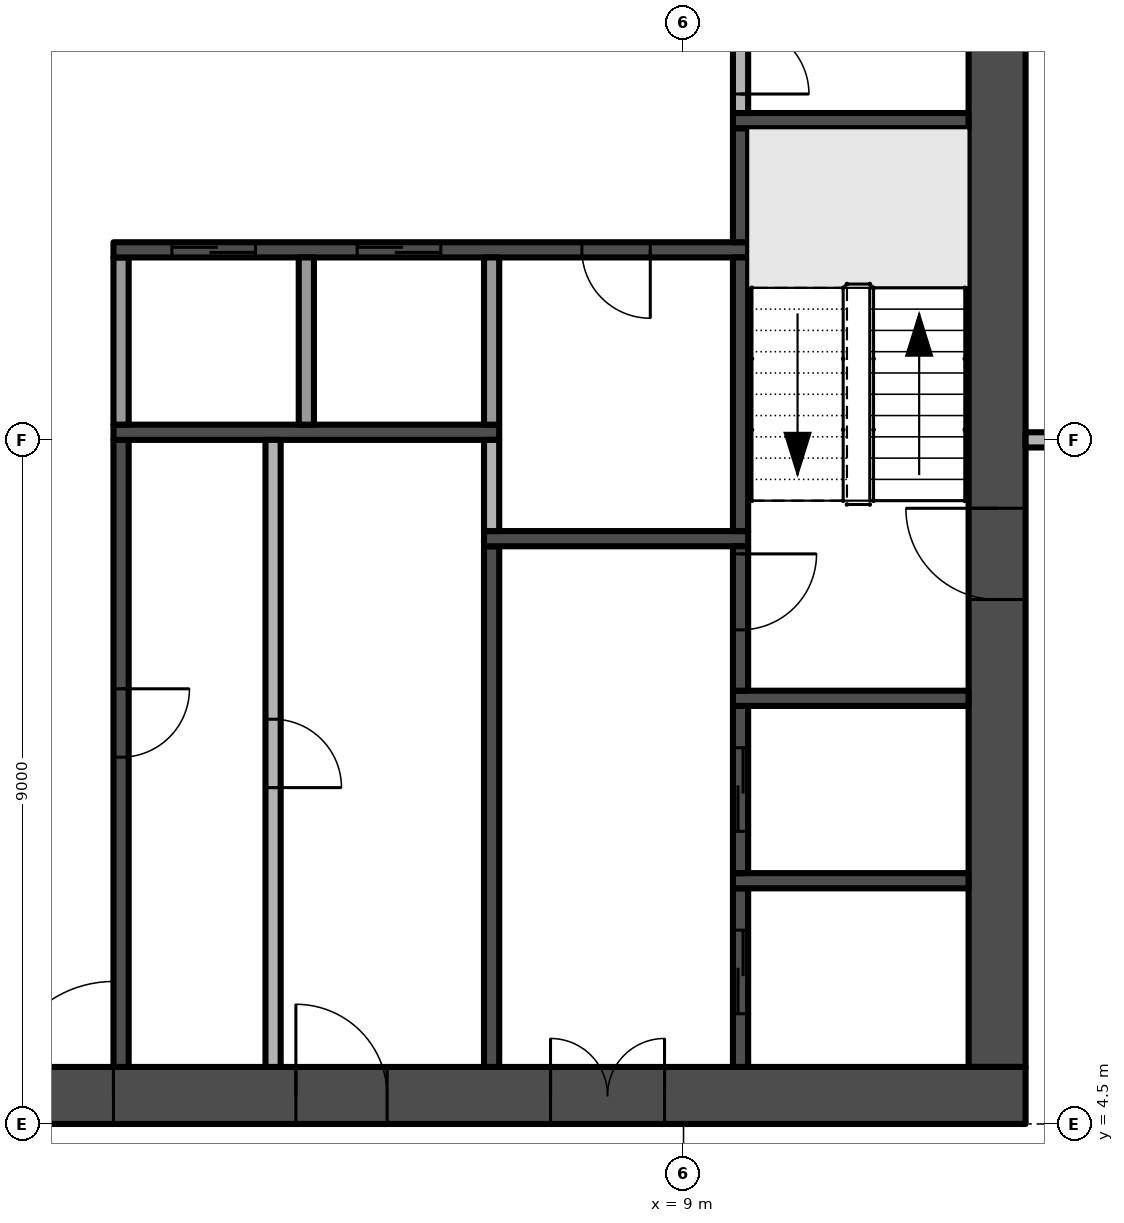
"""IFC4 building model, lengths in metres.
Left out: names, types, materials, properties, quantities, classifications, styles, units other than length and angle.
Written with IfcOpenShell. Run it as: python <this file> out.ifc"""

import sys

from ifc_helpers import new_model, si_unit, direction, frame, frame_2d, origin, place, context, subcontext, project, spatial, rectangle, extrude, element, fill, save


model = new_model("IFC4")
c1 = context("Model", 3, precision=1e-05, world=origin(), true_north=direction((0.0, 1.0)))
c2 = subcontext(c1, "Body", "Model", "MODEL_VIEW")
j1 = project(units=[si_unit("LENGTHUNIT", "METRE"), si_unit("PLANEANGLEUNIT", "RADIAN")], contexts=[c1])
p1 = place(None, origin())
s1 = spatial("IfcSite", under=j1, at=p1, CompositionType="ELEMENT")
p2 = place(p1, origin())
s2 = spatial("IfcBuilding", under=s1, at=p2, CompositionType="ELEMENT")
p3 = place(p2, frame((0.0, 0.0, 155.4)))
s3 = spatial("IfcBuildingStorey", under=s2, at=p3, CompositionType="ELEMENT", Elevation=155.4)
p4 = place(p3, frame((-13.5, 4.875, -0.3), z_axis=(0.0, 0.0, 1.0), x_axis=(1.0, 0.0, 0.0)))
e1 = element("IfcWall", 1, at=p4, inside=s3, PredefinedType="SHEAR", context=c2, shape_type="SweptSolid", body=[
    extrude(rectangle(XDim=27.0, YDim=0.75, at=frame_2d((13.5, 0.0))), origin(), (0.0, 0.0, 1.0), 3.8),
])
p5 = place(p4, frame((12.0, 0.0, 0.3)))
e2 = element("IfcOpeningElement", 2, at=p5, cuts=e1, PredefinedType="OPENING", context=c2, shape_type="SweptSolid", body=[
    extrude(rectangle(XDim=3.0, YDim=2.4, at=frame_2d((1.5, 1.2))), frame((0.0, 0.385, 0.0), z_axis=(0.0, -1.0, 0.0), x_axis=(1.0, 0.0, 0.0)), (0.0, 0.0, 1.0), 0.77),
])
p6 = place(p4, frame((4.9, 0.0, 0.3)))
e3 = element("IfcOpeningElement", 3, at=p6, cuts=e1, PredefinedType="OPENING", context=c2, shape_type="SweptSolid", body=[
    extrude(rectangle(XDim=1.2, YDim=2.2, at=frame_2d((0.6, 1.1))), frame((0.0, 0.385, 0.0), z_axis=(0.0, -1.0, 0.0), x_axis=(1.0, 0.0, 0.0)), (0.0, 0.0, 1.0), 0.77),
])
p7 = place(p4, frame((20.75, 0.0, 0.3)))
e4 = element("IfcOpeningElement", 4, at=p7, cuts=e1, PredefinedType="OPENING", context=c2, shape_type="SweptSolid", body=[
    extrude(rectangle(XDim=1.5, YDim=2.2, at=frame_2d((0.75, 1.1))), frame((0.0, 0.385, 0.0), z_axis=(0.0, -1.0, 0.0), x_axis=(1.0, 0.0, 0.0)), (0.0, 0.0, 1.0), 0.77),
])
p8 = place(p4, frame((17.4, 0.0, 0.3)))
e5 = element("IfcOpeningElement", 5, at=p8, cuts=e1, PredefinedType="OPENING", context=c2, shape_type="SweptSolid", body=[
    extrude(rectangle(XDim=1.2, YDim=2.2, at=frame_2d((0.6, 1.1))), frame((0.0, 0.385, 0.0), z_axis=(0.0, -1.0, 0.0), x_axis=(1.0, 0.0, 0.0)), (0.0, 0.0, 1.0), 0.77),
])
p9 = place(p3, frame((13.125, 5.25, -0.3), z_axis=(0.0, 0.0, 1.0), x_axis=(0.0, 1.0, 0.0)))
e6 = element("IfcWall", 6, at=p9, inside=s3, PredefinedType="SHEAR", context=c2, shape_type="SweptSolid", body=[
    extrude(rectangle(XDim=16.5, YDim=0.75, at=frame_2d((8.25, 0.0))), origin(), (0.0, 0.0, 1.0), 3.8),
])
p10 = place(p9, frame((6.15, 0.0, 0.3)))
e7 = element("IfcOpeningElement", 7, at=p10, cuts=e6, PredefinedType="OPENING", context=c2, shape_type="SweptSolid", body=[
    extrude(rectangle(XDim=1.2, YDim=2.2, at=frame_2d((0.6, 1.1))), frame((0.0, 0.385, 0.0), z_axis=(0.0, -1.0, 0.0), x_axis=(1.0, 0.0, 0.0)), (0.0, 0.0, 1.0), 0.77),
])
p11 = place(p3, frame((1.6, 13.5, 0.0), z_axis=(0.0, 0.0, 1.0), x_axis=(0.0, -1.0, 0.0)))
e8 = element("IfcWall", 8, at=p11, inside=s3, PredefinedType="SHEAR", context=c2, shape_type="SweptSolid", body=[
    extrude(rectangle(XDim=8.25, YDim=0.2, at=frame_2d((4.125, 0.0))), origin(), (0.0, 0.0, 1.0), 3.5),
])
p12 = place(p11, frame((3.275, 0.0, 0.0)))
e9 = element("IfcOpeningElement", 9, at=p12, cuts=e8, PredefinedType="OPENING", context=c2, shape_type="SweptSolid", body=[
    extrude(rectangle(XDim=0.9, YDim=2.1, at=frame_2d((0.45, 1.05))), frame((0.0, 0.11, 0.0), z_axis=(0.0, -1.0, 0.0), x_axis=(1.0, 0.0, 0.0)), (0.0, 0.0, 1.0), 0.22),
])
p13 = place(p3, frame((1.5, 13.6, 0.0), z_axis=(0.0, 0.0, 1.0), x_axis=(1.0, 0.0, 0.0)))
e10 = element("IfcWall", 10, at=p13, inside=s3, PredefinedType="SHEAR", context=c2, shape_type="SweptSolid", body=[
    extrude(rectangle(XDim=5.075, YDim=0.2, at=frame_2d((2.538, 0.0))), origin(), (0.0, 0.0, 1.0), 3.5),
])
p14 = place(p3, frame((1.6, 13.7, 0.0), z_axis=(0.0, 0.0, 1.0), x_axis=(0.0, 1.0, 0.0)))
e11 = element("IfcWall", 11, at=p14, inside=s3, PredefinedType="PARTITIONING", context=c2, shape_type="SweptSolid", body=[
    extrude(rectangle(XDim=2.2, YDim=0.2, at=frame_2d((1.1, 0.0))), origin(), (0.0, 0.0, 1.0), 3.5),
])
p15 = place(p3, frame((9.85, 16.0, 0.0), z_axis=(0.0, 0.0, 1.0), x_axis=(-1.0, 0.0, 0.0)))
e12 = element("IfcWall", 12, at=p15, inside=s3, PredefinedType="SHEAR", context=c2, shape_type="SweptSolid", body=[
    extrude(rectangle(XDim=8.35, YDim=0.2, at=frame_2d((4.175, 0.0))), origin(), (0.0, 0.0, 1.0), 3.5),
])
p16 = place(p15, frame((6.481, 0.0, 0.0)))
e13 = element("IfcOpeningElement", 13, at=p16, cuts=e12, PredefinedType="OPENING", context=c2, shape_type="SweptSolid", body=[
    extrude(rectangle(XDim=1.1, YDim=2.1, at=frame_2d((0.55, 1.05))), frame((0.0, 0.11, 0.0), z_axis=(0.0, -1.0, 0.0), x_axis=(1.0, 0.0, 0.0)), (0.0, 0.0, 1.0), 0.22),
])
p17 = place(p15, frame((4.044, 0.0, 0.0)))
e14 = element("IfcOpeningElement", 14, at=p17, cuts=e12, PredefinedType="OPENING", context=c2, shape_type="SweptSolid", body=[
    extrude(rectangle(XDim=1.1, YDim=2.1, at=frame_2d((0.55, 1.05))), frame((0.0, 0.11, 0.0), z_axis=(0.0, -1.0, 0.0), x_axis=(1.0, 0.0, 0.0)), (0.0, 0.0, 1.0), 0.22),
])
p18 = place(p15, frame((1.288, 0.0, 0.0)))
e15 = element("IfcOpeningElement", 15, at=p18, cuts=e12, PredefinedType="OPENING", context=c2, shape_type="SweptSolid", body=[
    extrude(rectangle(XDim=0.9, YDim=2.1, at=frame_2d((0.45, 1.05))), frame((0.0, 0.11, 0.0), z_axis=(0.0, -1.0, 0.0), x_axis=(1.0, 0.0, 0.0)), (0.0, 0.0, 1.0), 0.22),
])
p19 = place(p3, frame((3.6, 13.5, 0.0), z_axis=(0.0, 0.0, 1.0), x_axis=(0.0, -1.0, 0.0)))
e16 = element("IfcWall", 16, at=p19, inside=s3, PredefinedType="PARTITIONING", context=c2, shape_type="SweptSolid", body=[
    extrude(rectangle(XDim=8.25, YDim=0.2, at=frame_2d((4.125, 0.0))), origin(), (0.0, 0.0, 1.0), 3.5),
])
p20 = place(p19, frame((3.675, 0.0, 0.0)))
e17 = element("IfcOpeningElement", 17, at=p20, cuts=e16, PredefinedType="OPENING", context=c2, shape_type="SweptSolid", body=[
    extrude(rectangle(XDim=0.9, YDim=2.1, at=frame_2d((0.45, 1.05))), frame((0.0, 0.11, 0.0), z_axis=(0.0, -1.0, 0.0), x_axis=(1.0, 0.0, 0.0)), (0.0, 0.0, 1.0), 0.22),
])
p21 = place(p3, frame((4.037, 13.7, 0.0), z_axis=(0.0, 0.0, 1.0), x_axis=(0.0, 1.0, 0.0)))
e18 = element("IfcWall", 18, at=p21, inside=s3, PredefinedType="PARTITIONING", context=c2, shape_type="SweptSolid", body=[
    extrude(rectangle(XDim=2.2, YDim=0.2, at=frame_2d((1.1, 0.0))), origin(), (0.0, 0.0, 1.0), 3.5),
])
p22 = place(p3, frame((6.475, 5.25, 0.0), z_axis=(0.0, 0.0, 1.0), x_axis=(0.0, 1.0, 0.0)))
e19 = element("IfcWall", 19, at=p22, inside=s3, PredefinedType="SHEAR", context=c2, shape_type="SweptSolid", body=[
    extrude(rectangle(XDim=6.85, YDim=0.2, at=frame_2d((3.425, 0.0))), origin(), (0.0, 0.0, 1.0), 3.5),
])
p23 = place(p3, frame((6.375, 12.2, 0.0), z_axis=(0.0, 0.0, 1.0), x_axis=(1.0, 0.0, 0.0)))
e20 = element("IfcWall", 20, at=p23, inside=s3, PredefinedType="SHEAR", context=c2, shape_type="SweptSolid", body=[
    extrude(rectangle(XDim=3.475, YDim=0.2, at=frame_2d((1.738, 0.0))), origin(), (0.0, 0.0, 1.0), 3.5),
])
p24 = place(p3, frame((6.475, 12.3, 0.0), z_axis=(0.0, 0.0, 1.0), x_axis=(0.0, 1.0, 0.0)))
e21 = element("IfcWall", 21, at=p24, inside=s3, PredefinedType="PARTITIONING", context=c2, shape_type="SweptSolid", body=[
    extrude(rectangle(XDim=1.2, YDim=0.2, at=frame_2d((0.6, 0.0))), origin(), (0.0, 0.0, 1.0), 3.5),
])
p25 = place(p3, frame((6.475, 13.7, 0.0), z_axis=(0.0, 0.0, 1.0), x_axis=(0.0, 1.0, 0.0)))
e22 = element("IfcWall", 22, at=p25, inside=s3, PredefinedType="PARTITIONING", context=c2, shape_type="SweptSolid", body=[
    extrude(rectangle(XDim=2.2, YDim=0.2, at=frame_2d((1.1, 0.0))), origin(), (0.0, 0.0, 1.0), 3.5),
])
p26 = place(p3, frame((9.75, 5.25, 0.0), z_axis=(0.0, 0.0, 1.0), x_axis=(0.0, 1.0, 0.0)))
e23 = element("IfcWall", 23, at=p26, inside=s3, PredefinedType="SHEAR", context=c2, shape_type="SweptSolid", body=[
    extrude(rectangle(XDim=2.35, YDim=0.2, at=frame_2d((1.175, 0.0))), origin(), (0.0, 0.0, 1.0), 3.5),
])
p27 = place(p26, frame((0.7, 0.0, 0.0)))
e24 = element("IfcOpeningElement", 24, at=p27, cuts=e23, PredefinedType="OPENING", context=c2, shape_type="SweptSolid", body=[
    extrude(rectangle(XDim=1.1, YDim=2.1, at=frame_2d((0.55, 1.05))), frame((0.0, 0.11, 0.0), z_axis=(0.0, -1.0, 0.0), x_axis=(1.0, 0.0, 0.0)), (0.0, 0.0, 1.0), 0.22),
])
p28 = place(p3, frame((9.65, 7.7, 0.0), z_axis=(0.0, 0.0, 1.0), x_axis=(1.0, 0.0, 0.0)))
e25 = element("IfcWall", 25, at=p28, inside=s3, PredefinedType="SHEAR", context=c2, shape_type="SweptSolid", body=[
    extrude(rectangle(XDim=3.1, YDim=0.2, at=frame_2d((1.55, 0.0))), origin(), (0.0, 0.0, 1.0), 3.5),
])
p29 = place(p3, frame((9.75, 7.8, 0.0), z_axis=(0.0, 0.0, 1.0), x_axis=(0.0, 1.0, 0.0)))
e26 = element("IfcWall", 26, at=p29, inside=s3, PredefinedType="SHEAR", context=c2, shape_type="SweptSolid", body=[
    extrude(rectangle(XDim=2.2, YDim=0.2, at=frame_2d((1.1, 0.0))), origin(), (0.0, 0.0, 1.0), 3.5),
])
p30 = place(p29, frame((0.55, 0.0, 0.0)))
e27 = element("IfcOpeningElement", 27, at=p30, cuts=e26, PredefinedType="OPENING", context=c2, shape_type="SweptSolid", body=[
    extrude(rectangle(XDim=1.1, YDim=2.1, at=frame_2d((0.55, 1.05))), frame((0.0, 0.11, 0.0), z_axis=(0.0, -1.0, 0.0), x_axis=(1.0, 0.0, 0.0)), (0.0, 0.0, 1.0), 0.22),
])
p31 = place(p3, frame((9.65, 10.1, 0.0), z_axis=(0.0, 0.0, 1.0), x_axis=(1.0, 0.0, 0.0)))
e28 = element("IfcWall", 28, at=p31, inside=s3, PredefinedType="SHEAR", context=c2, shape_type="SweptSolid", body=[
    extrude(rectangle(XDim=3.1, YDim=0.2, at=frame_2d((1.55, 0.0))), origin(), (0.0, 0.0, 1.0), 3.5),
])
p32 = place(p3, frame((9.75, 12.1, 0.0), z_axis=(0.0, 0.0, 1.0), x_axis=(0.0, -1.0, 0.0)))
e29 = element("IfcWall", 29, at=p32, inside=s3, PredefinedType="SHEAR", context=c2, shape_type="SweptSolid", body=[
    extrude(rectangle(XDim=1.9, YDim=0.2, at=frame_2d((0.95, 0.0))), origin(), (0.0, 0.0, 1.0), 3.5),
])
p33 = place(p32, frame((0.1, 0.0, 0.0)))
e30 = element("IfcOpeningElement", 30, at=p33, cuts=e29, PredefinedType="OPENING", context=c2, shape_type="SweptSolid", body=[
    extrude(rectangle(XDim=1.0, YDim=2.2, at=frame_2d((0.5, 1.1))), frame((0.0, 0.11, 0.0), z_axis=(0.0, -1.0, 0.0), x_axis=(1.0, 0.0, 0.0)), (0.0, 0.0, 1.0), 0.22),
])
p34 = place(p3, frame((9.75, 12.3, 0.0), z_axis=(0.0, 0.0, 1.0), x_axis=(0.0, 1.0, 0.0)))
e31 = element("IfcWall", 31, at=p34, inside=s3, PredefinedType="SHEAR", context=c2, shape_type="SweptSolid", body=[
    extrude(rectangle(XDim=3.6, YDim=0.2, at=frame_2d((1.8, 0.0))), origin(), (0.0, 0.0, 1.0), 3.5),
])
p35 = place(p3, frame((9.75, 16.1, 0.0), z_axis=(0.0, 0.0, 1.0), x_axis=(0.0, 1.0, 0.0)))
e32 = element("IfcWall", 32, at=p35, inside=s3, PredefinedType="SHEAR", context=c2, shape_type="SweptSolid", body=[
    extrude(rectangle(XDim=1.5, YDim=0.2, at=frame_2d((0.75, 0.0))), origin(), (0.0, 0.0, 1.0), 3.5),
])
p36 = place(p3, frame((9.65, 17.7, 0.0), z_axis=(0.0, 0.0, 1.0), x_axis=(1.0, 0.0, 0.0)))
e33 = element("IfcWall", 33, at=p36, inside=s3, PredefinedType="SHEAR", context=c2, shape_type="SweptSolid", body=[
    extrude(rectangle(XDim=3.1, YDim=0.2, at=frame_2d((1.55, 0.0))), origin(), (0.0, 0.0, 1.0), 3.5),
])
p37 = place(p3, frame((9.75, 19.2, 0.0), z_axis=(0.0, 0.0, 1.0), x_axis=(0.0, -1.0, 0.0)))
e34 = element("IfcWall", 34, at=p37, inside=s3, PredefinedType="PARTITIONING", context=c2, shape_type="SweptSolid", body=[
    extrude(rectangle(XDim=1.4, YDim=0.2, at=frame_2d((0.7, 0.0))), origin(), (0.0, 0.0, 1.0), 3.5),
])
p38 = place(p37, frame((0.25, 0.0, 0.0)))
e35 = element("IfcOpeningElement", 35, at=p38, cuts=e34, PredefinedType="OPENING", context=c2, shape_type="SweptSolid", body=[
    extrude(rectangle(XDim=0.9, YDim=2.1, at=frame_2d((0.45, 1.05))), frame((0.0, 0.11, 0.0), z_axis=(0.0, -1.0, 0.0), x_axis=(1.0, 0.0, 0.0)), (0.0, 0.0, 1.0), 0.22),
])
p39 = place(p3, frame((13.5, 13.5, 0.0), z_axis=(0.0, 0.0, 1.0), x_axis=(1.0, 0.0, 0.0)))
e36 = element("IfcWall", 36, at=p39, inside=s3, PredefinedType="PARTITIONING", context=c2, shape_type="SweptSolid", body=[
    extrude(rectangle(XDim=3.875, YDim=0.2, at=frame_2d((1.938, 0.0))), origin(), (0.0, 0.0, 1.0), 3.5),
])
p40 = place(p39, frame((1.6, 0.0, 0.0)))
e37 = element("IfcOpeningElement", 37, at=p40, cuts=e36, PredefinedType="OPENING", context=c2, shape_type="SweptSolid", body=[
    extrude(rectangle(XDim=0.9, YDim=2.1, at=frame_2d((0.45, 1.05))), frame((0.0, 0.11, 0.0), z_axis=(0.0, -1.0, 0.0), x_axis=(1.0, 0.0, 0.0)), (0.0, 0.0, 1.0), 0.22),
])
p41 = place(p5, frame((3.0, 0.0, 0.0), z_axis=(0.0, 0.0, 1.0), x_axis=(-1.0, 0.0, 0.0)))
e38 = element("IfcDoor", 38, at=p41, inside=s3, OperationType="DOUBLE_DOOR_SINGLE_SWING", PredefinedType="DOOR", context=c2, shape_type="SweptSolid", body=[
    extrude(rectangle(XDim=3.0, YDim=2.4, at=frame_2d((1.5, 1.2))), frame((0.0, 0.025, 0.0), z_axis=(0.0, -1.0, 0.0), x_axis=(1.0, 0.0, 0.0)), (0.0, 0.0, 1.0), 0.05),
])
fill(e2, e38)
p42 = place(p10, frame((1.2, 0.0, 0.0), z_axis=(0.0, 0.0, 1.0), x_axis=(-1.0, 0.0, 0.0)))
e39 = element("IfcDoor", 39, at=p42, inside=s3, OperationType="SINGLE_SWING_LEFT", PredefinedType="DOOR", context=c2, shape_type="SweptSolid", body=[
    extrude(rectangle(XDim=1.2, YDim=2.2, at=frame_2d((0.6, 1.1))), frame((0.0, 0.025, 0.0), z_axis=(0.0, -1.0, 0.0), x_axis=(1.0, 0.0, 0.0)), (0.0, 0.0, 1.0), 0.05),
])
fill(e7, e39)
p43 = place(p7, frame((1.5, 0.0, 0.0), z_axis=(0.0, 0.0, 1.0), x_axis=(-1.0, 0.0, 0.0)))
e40 = element("IfcDoor", 40, at=p43, inside=s3, OperationType="DOUBLE_DOOR_SINGLE_SWING", PredefinedType="DOOR", context=c2, shape_type="SweptSolid", body=[
    extrude(rectangle(XDim=1.5, YDim=2.2, at=frame_2d((0.75, 1.1))), frame((0.0, 0.025, 0.0), z_axis=(0.0, -1.0, 0.0), x_axis=(1.0, 0.0, 0.0)), (0.0, 0.0, 1.0), 0.05),
])
fill(e4, e40)
p44 = place(p8, frame((1.2, 0.0, 0.0), z_axis=(0.0, 0.0, 1.0), x_axis=(-1.0, 0.0, 0.0)))
e41 = element("IfcDoor", 41, at=p44, inside=s3, OperationType="SINGLE_SWING_RIGHT", PredefinedType="DOOR", context=c2, shape_type="SweptSolid", body=[
    extrude(rectangle(XDim=1.2, YDim=2.2, at=frame_2d((0.6, 1.1))), frame((0.0, 0.025, 0.0), z_axis=(0.0, -1.0, 0.0), x_axis=(1.0, 0.0, 0.0)), (0.0, 0.0, 1.0), 0.05),
])
fill(e5, e41)
p45 = place(p33, origin())
e42 = element("IfcDoor", 42, at=p45, inside=s3, OperationType="SINGLE_SWING_LEFT", PredefinedType="DOOR", context=c2, shape_type="SweptSolid", body=[
    extrude(rectangle(XDim=1.0, YDim=2.2, at=frame_2d((0.5, 1.1))), frame((0.0, 0.025, 0.0), z_axis=(0.0, -1.0, 0.0), x_axis=(1.0, 0.0, 0.0)), (0.0, 0.0, 1.0), 0.05),
])
fill(e30, e42)
p46 = place(p16, origin())
e43 = element("IfcDoor", 43, at=p46, inside=s3, OperationType="SLIDING_TO_RIGHT", PredefinedType="DOOR", context=c2, shape_type="SweptSolid", body=[
    extrude(rectangle(XDim=1.1, YDim=2.1, at=frame_2d((0.55, 1.05))), frame((0.0, 0.025, 0.0), z_axis=(0.0, -1.0, 0.0), x_axis=(1.0, 0.0, 0.0)), (0.0, 0.0, 1.0), 0.05),
])
fill(e13, e43)
p47 = place(p17, origin())
e44 = element("IfcDoor", 44, at=p47, inside=s3, OperationType="SLIDING_TO_RIGHT", PredefinedType="DOOR", context=c2, shape_type="SweptSolid", body=[
    extrude(rectangle(XDim=1.1, YDim=2.1, at=frame_2d((0.55, 1.05))), frame((0.0, 0.025, 0.0), z_axis=(0.0, -1.0, 0.0), x_axis=(1.0, 0.0, 0.0)), (0.0, 0.0, 1.0), 0.05),
])
fill(e14, e44)
p48 = place(p27, origin())
e45 = element("IfcDoor", 45, at=p48, inside=s3, OperationType="SLIDING_TO_RIGHT", PredefinedType="DOOR", context=c2, shape_type="SweptSolid", body=[
    extrude(rectangle(XDim=1.1, YDim=2.1, at=frame_2d((0.55, 1.05))), frame((0.0, 0.025, 0.0), z_axis=(0.0, -1.0, 0.0), x_axis=(1.0, 0.0, 0.0)), (0.0, 0.0, 1.0), 0.05),
])
fill(e24, e45)
p49 = place(p30, origin())
e46 = element("IfcDoor", 46, at=p49, inside=s3, OperationType="SLIDING_TO_RIGHT", PredefinedType="DOOR", context=c2, shape_type="SweptSolid", body=[
    extrude(rectangle(XDim=1.1, YDim=2.1, at=frame_2d((0.55, 1.05))), frame((0.0, 0.025, 0.0), z_axis=(0.0, -1.0, 0.0), x_axis=(1.0, 0.0, 0.0)), (0.0, 0.0, 1.0), 0.05),
])
fill(e27, e46)
p50 = place(p12, origin())
e47 = element("IfcDoor", 47, at=p50, inside=s3, OperationType="SINGLE_SWING_LEFT", PredefinedType="DOOR", context=c2, shape_type="SweptSolid", body=[
    extrude(rectangle(XDim=0.9, YDim=2.1, at=frame_2d((0.45, 1.05))), frame((0.0, 0.025, 0.0), z_axis=(0.0, -1.0, 0.0), x_axis=(1.0, 0.0, 0.0)), (0.0, 0.0, 1.0), 0.05),
])
fill(e9, e47)
p51 = place(p18, origin())
e48 = element("IfcDoor", 48, at=p51, inside=s3, OperationType="SINGLE_SWING_LEFT", PredefinedType="DOOR", context=c2, shape_type="SweptSolid", body=[
    extrude(rectangle(XDim=0.9, YDim=2.1, at=frame_2d((0.45, 1.05))), frame((0.0, 0.025, 0.0), z_axis=(0.0, -1.0, 0.0), x_axis=(1.0, 0.0, 0.0)), (0.0, 0.0, 1.0), 0.05),
])
fill(e15, e48)
p52 = place(p38, origin())
e49 = element("IfcDoor", 49, at=p52, inside=s3, OperationType="SINGLE_SWING_RIGHT", PredefinedType="DOOR", context=c2, shape_type="SweptSolid", body=[
    extrude(rectangle(XDim=0.9, YDim=2.1, at=frame_2d((0.45, 1.05))), frame((0.0, 0.025, 0.0), z_axis=(0.0, -1.0, 0.0), x_axis=(1.0, 0.0, 0.0)), (0.0, 0.0, 1.0), 0.05),
])
fill(e35, e49)
p53 = place(p20, origin())
e50 = element("IfcDoor", 50, at=p53, inside=s3, OperationType="SINGLE_SWING_RIGHT", PredefinedType="DOOR", context=c2, shape_type="SweptSolid", body=[
    extrude(rectangle(XDim=0.9, YDim=2.1, at=frame_2d((0.45, 1.05))), frame((0.0, 0.025, 0.0), z_axis=(0.0, -1.0, 0.0), x_axis=(1.0, 0.0, 0.0)), (0.0, 0.0, 1.0), 0.05),
])
fill(e17, e50)
save(model, sys.argv[1])
